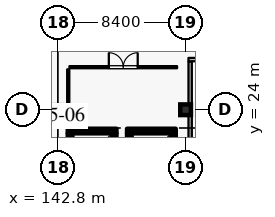
"""IFC4 building model, lengths in metres.
Left out: names, types, materials, properties, quantities, classifications, styles, units other than length and angle.
Written with IfcOpenShell. Run it as: python <this file> out.ifc"""

import sys

from ifc_helpers import new_model, si_unit, direction, frame, frame_2d, origin, origin_2d, place, context, subcontext, project, spatial, rectangle, extrude, element, fill, save


model = new_model("IFC4")
c1 = context("Model", 3, precision=1e-05, world=origin(), true_north=direction((0.0, 1.0)))
c2 = subcontext(c1, "Body", "Model", "MODEL_VIEW")
j1 = project(units=[si_unit("LENGTHUNIT", "METRE"), si_unit("PLANEANGLEUNIT", "RADIAN")], contexts=[c1])
p1 = place(None, origin())
s1 = spatial("IfcSite", under=j1, at=p1, CompositionType="ELEMENT")
p2 = place(p1, origin())
s2 = spatial("IfcBuilding", under=s1, at=p2, CompositionType="ELEMENT")
p3 = place(p2, frame((0.0, 0.0, 36.0)))
s3 = spatial("IfcBuildingStorey", under=s2, at=p3, CompositionType="ELEMENT", Elevation=36.0)
p4 = place(p3, frame((151.2, 24.0, 0.0), z_axis=(0.0, 0.0, 1.0), x_axis=(1.0, 0.0, 0.0)))
e1 = element("IfcColumn", 1, at=p4, inside=s3, PredefinedType="COLUMN", context=c2, shape_type="SweptSolid", body=[
    extrude(rectangle(XDim=0.7, YDim=0.7, at=origin_2d()), origin(), (0.0, 0.0, 1.0), 3.6),
])
p5 = place(p3, frame((142.8, 24.0, 0.0), z_axis=(0.0, 0.0, 1.0), x_axis=(1.0, 0.0, 0.0)))
e2 = element("IfcColumn", 2, at=p5, inside=s3, PredefinedType="COLUMN", context=c2, shape_type="SweptSolid", body=[
    extrude(rectangle(XDim=0.6, YDim=0.6, at=origin_2d()), origin(), (0.0, 0.0, 1.0), 3.6),
])
p6 = place(p3, frame((146.5, 19.755, 0.0), z_axis=(0.0, 0.0, 1.0), x_axis=(0.0, 1.0, 0.0)))
e3 = element("IfcWall", 3, at=p6, inside=s3, PredefinedType="SHEAR", context=c2, shape_type="SweptSolid", body=[
    extrude(rectangle(XDim=2.69, YDim=0.3, at=frame_2d((1.345, 0.0))), origin(), (0.0, 0.0, 1.0), 3.365),
])
p7 = place(p3, frame((146.65, 22.6, 0.0), z_axis=(0.0, 0.0, 1.0), x_axis=(-1.0, 0.0, 0.0)))
e4 = element("IfcWall", 4, at=p7, inside=s3, PredefinedType="SHEAR", context=c2, shape_type="SweptSolid", body=[
    extrude(rectangle(XDim=3.2, YDim=0.3, at=frame_2d((1.6, 0.0))), origin(), (0.0, 0.0, 1.0), 3.365),
])
for number, where, z_axis, x_axis in (
    (5, (143.6, 22.445, 0.0), (0.0, 0.0, 1.0), (0.0, -1.0, 0.0)),
    (6, (150.4, 19.755, 0.0), (0.0, 0.0, 1.0), (0.0, 1.0, 0.0)),
):
    element("IfcWall", number, at=place(p3, frame(where, z_axis=z_axis, x_axis=x_axis)), inside=s3, PredefinedType="SHEAR", context=c2, shape_type="SweptSolid", body=[
        extrude(rectangle(XDim=2.69, YDim=0.3, at=frame_2d((1.345, 0.0))), origin(), (0.0, 0.0, 1.0), 3.365),
    ])
p8 = place(p3, frame((150.55, 22.6, 0.0), z_axis=(0.0, 0.0, 1.0), x_axis=(-1.0, 0.0, 0.0)))
e7 = element("IfcWall", 7, at=p8, inside=s3, PredefinedType="SHEAR", context=c2, shape_type="SweptSolid", body=[
    extrude(rectangle(XDim=3.2, YDim=0.3, at=frame_2d((1.6, 0.0))), origin(), (0.0, 0.0, 1.0), 3.365),
])
p9 = place(p3, frame((147.5, 22.445, 0.0), z_axis=(0.0, 0.0, 1.0), x_axis=(0.0, -1.0, 0.0)))
e8 = element("IfcWall", 8, at=p9, inside=s3, PredefinedType="SHEAR", context=c2, shape_type="SweptSolid", body=[
    extrude(rectangle(XDim=2.69, YDim=0.3, at=frame_2d((1.345, 0.0))), origin(), (0.0, 0.0, 1.0), 3.365),
])
p10 = place(p3, frame((151.5, 21.365, 0.0), z_axis=(0.0, 0.0, 1.0), x_axis=(0.0, 1.0, 0.0)))
e9 = element("IfcWall", 9, at=p10, inside=s3, PredefinedType="PARTITIONING", context=c2, shape_type="SweptSolid", body=[
    extrude(rectangle(XDim=5.82, YDim=0.22, at=frame_2d((2.91, 0.0))), origin(), (0.0, 0.0, 1.0), 3.365),
])
p11 = place(p3, frame((151.39, 27.3, 0.0), z_axis=(0.0, 0.0, 1.0), x_axis=(1.0, 0.0, 0.0)))
e10 = element("IfcWall", 10, at=p11, inside=s3, PredefinedType="PARTITIONING", context=c2, shape_type="SweptSolid", body=[
    extrude(rectangle(XDim=3.82, YDim=0.22, at=frame_2d((1.91, 0.0))), origin(), (0.0, 0.0, 1.0), 3.365),
])
p12 = place(p11, frame((1.35, 0.0, 0.0)))
e11 = element("IfcOpeningElement", 11, at=p12, cuts=e10, PredefinedType="OPENING", context=c2, shape_type="SweptSolid", body=[
    extrude(rectangle(XDim=1.12, YDim=2.2, at=frame_2d((0.56, 1.1))), frame((0.0, 0.12, 0.0), z_axis=(0.0, -1.0, 0.0), x_axis=(1.0, 0.0, 0.0)), (0.0, 0.0, 1.0), 0.24),
])
p13 = place(p3, frame((143.56, 26.8, 0.0), z_axis=(0.0, 0.0, 1.0), x_axis=(1.0, 0.0, 0.0)))
e12 = element("IfcWall", 12, at=p13, inside=s3, PredefinedType="PARTITIONING", context=c2, shape_type="SweptSolid", body=[
    extrude(rectangle(XDim=7.08, YDim=0.14, at=frame_2d((3.54, 0.0))), origin(), (0.0, 0.0, 1.0), 3.365),
])
p14 = place(p13, frame((2.59, 0.0, 0.0)))
e13 = element("IfcOpeningElement", 13, at=p14, cuts=e12, PredefinedType="OPENING", context=c2, shape_type="SweptSolid", body=[
    extrude(rectangle(XDim=1.9, YDim=2.4, at=frame_2d((0.95, 1.2))), frame((0.0, 0.08, 0.0), z_axis=(0.0, -1.0, 0.0), x_axis=(1.0, 0.0, 0.0)), (0.0, 0.0, 1.0), 0.16),
])
p15 = place(p3, frame((143.48, 23.45, 0.0), z_axis=(0.0, 0.0, 1.0), x_axis=(0.0, 1.0, 0.0)))
e14 = element("IfcWall", 14, at=p15, inside=s3, PredefinedType="PARTITIONING", context=c2, shape_type="SweptSolid", body=[
    extrude(rectangle(XDim=3.21, YDim=0.14, at=frame_2d((1.605, 0.0))), origin(), (0.0, 0.0, 1.0), 3.365),
])
p16 = place(p14, origin())
e15 = element("IfcDoor", 15, at=p16, inside=s3, OperationType="DOUBLE_DOOR_SINGLE_SWING", PredefinedType="DOOR", context=c2, shape_type="SweptSolid", body=[
    extrude(rectangle(XDim=1.9, YDim=2.4, at=frame_2d((0.95, 1.2))), frame((0.0, 0.025, 0.0), z_axis=(0.0, -1.0, 0.0), x_axis=(1.0, 0.0, 0.0)), (0.0, 0.0, 1.0), 0.05),
])
fill(e13, e15)
save(model, sys.argv[1])
